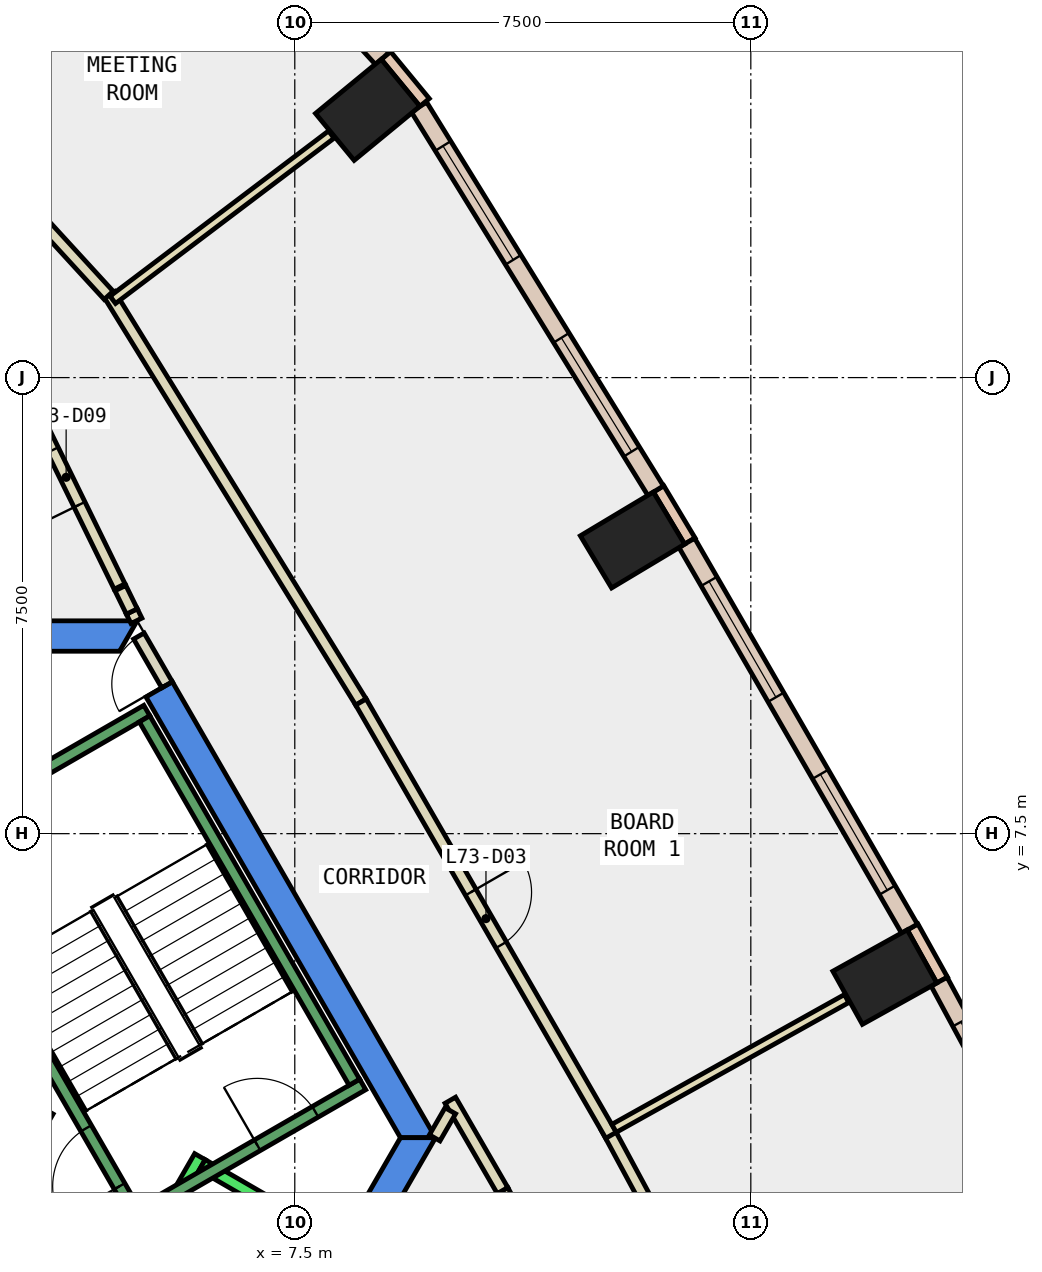
"""IFC4 building model, lengths in metres.
Left out: names, types, materials, properties, quantities, classifications, styles, units other than length and angle.
Written with IfcOpenShell. Run it as: python <this file> out.ifc"""

import sys

from ifc_helpers import new_model, si_unit, direction, frame, frame_2d, origin, origin_2d, place, context, subcontext, project, spatial, polyline, rectangle, outline, extrude, element, fill, save


model = new_model("IFC4")
c1 = context("Model", 3, precision=1e-05, world=origin(), true_north=direction((0.0, 1.0)))
c2 = subcontext(c1, "Body", "Model", "MODEL_VIEW")
j1 = project(units=[si_unit("LENGTHUNIT", "METRE"), si_unit("PLANEANGLEUNIT", "RADIAN")], contexts=[c1])
p1 = place(None, origin())
s1 = spatial("IfcSite", under=j1, at=p1, CompositionType="ELEMENT")
p2 = place(p1, origin())
s2 = spatial("IfcBuilding", under=s1, at=p2, CompositionType="ELEMENT")
p3 = place(p2, frame((0.0, 0.0, 311.6)))
s3 = spatial("IfcBuildingStorey", under=s2, at=p3, CompositionType="ELEMENT", Elevation=311.6)
for number, where, z_axis, x_axis in (
    (1, (17.204, 5.141, -0.34), (0.0, 0.0, 1.0), (-0.486, 0.874, 0.0)),
    (2, (13.054, 12.329, -0.34), (0.0, 0.0, 1.0), (-0.514, 0.858, 0.0)),
    (3, (8.699, 19.403, -0.34), (0.0, 0.0, 1.0), (-0.636, 0.772, 0.0)),
):
    element("IfcColumn", number, at=place(p3, frame(where, z_axis=z_axis, x_axis=x_axis)), inside=s3, PredefinedType="COLUMN", context=c2, shape_type="SweptSolid", body=[
        extrude(rectangle(XDim=1.0, YDim=1.4, at=origin_2d()), origin(), (0.0, 0.0, 1.0), 3.6),
    ])
p4 = place(p3, frame((0.0, 0.0, -0.34)))
e4 = element("IfcWall", 4, at=p4, inside=s3, PredefinedType="SHEAR", context=c2, shape_type="SweptSolid", body=[
    extrude(outline(polyline([(5.486, 9.998), (5.053, 9.748), (9.238, 2.5), (9.815, 2.5), (5.486, 9.998)])), origin(), (0.0, 0.0, 1.0), 3.6),
])
p5 = place(p3, frame((0.0, 0.0, -0.34)))
e5 = element("IfcWall", 5, at=p5, inside=s3, PredefinedType="SHEAR", context=c2, shape_type="SweptSolid", body=[
    extrude(outline(polyline([(4.907, 11.0), (-4.907, 11.0), (-4.619, 10.5), (4.619, 10.5), (4.907, 11.0)])), origin(), (0.0, 0.0, 1.0), 3.6),
])
p6 = place(p3, frame((0.0, 0.0, -0.34)))
e6 = element("IfcWall", 6, at=p6, inside=s3, PredefinedType="SHEAR", context=c2, shape_type="SweptSolid", body=[
    extrude(outline(polyline([(4.907, -6.0), (9.815, 2.5), (9.238, 2.5), (4.619, -5.5), (4.907, -6.0)])), origin(), (0.0, 0.0, 1.0), 3.6),
])
p7 = place(p3, frame((18.147, 5.092, 0.0), z_axis=(0.0, 0.0, 1.0), x_axis=(-0.486036693078, 0.873938403425, 0.0)))
e7 = element("IfcWall", 7, at=p7, inside=s3, PredefinedType="STANDARD", context=c2, shape_type="SweptSolid", body=[
    extrude(rectangle(XDim=1.0, YDim=0.2, at=frame_2d((0.5, 0.0))), origin(), (0.0, 0.0, 1.0), 3.26),
])
p8 = place(p3, frame((13.997, 12.312, 0.0), z_axis=(0.0, 0.0, 1.0), x_axis=(-0.514064933905, 0.857751271482, 0.0)))
e8 = element("IfcWall", 8, at=p8, inside=s3, PredefinedType="STANDARD", context=c2, shape_type="SweptSolid", body=[
    extrude(rectangle(XDim=1.0, YDim=0.2, at=frame_2d((0.5, 0.0))), origin(), (0.0, 0.0, 1.0), 3.26),
])
p9 = place(p3, frame((9.635, 19.525, 0.0), z_axis=(0.0, 0.0, 1.0), x_axis=(-0.6357329148, 0.77190910154, 0.0)))
e9 = element("IfcWall", 9, at=p9, inside=s3, PredefinedType="STANDARD", context=c2, shape_type="SweptSolid", body=[
    extrude(rectangle(XDim=1.0, YDim=0.2, at=frame_2d((0.5, 0.0))), origin(), (0.0, 0.0, 1.0), 3.26),
])
p10 = place(p3, frame((21.615, -1.462, 0.0), z_axis=(0.0, 0.0, 1.0), x_axis=(-0.474421773145, 0.880297666228, 0.0)))
e10 = element("IfcWall", 10, at=p10, inside=s3, PredefinedType="STANDARD", context=c2, shape_type="SweptSolid", body=[
    extrude(rectangle(XDim=7.416, YDim=0.3, at=frame_2d((3.708, 0.0))), origin(), (0.0, 0.0, 1.0), 3.26),
])
p11 = place(p10, frame((0.754, 0.0, 0.9)))
e11 = element("IfcOpeningElement", 11, at=p11, cuts=e10, PredefinedType="OPENING", context=c2, shape_type="SweptSolid", body=[
    extrude(rectangle(XDim=2.2, YDim=2.0, at=frame_2d((1.1, 1.0))), frame((0.0, 0.16, 0.0), z_axis=(0.0, -1.0, 0.0), x_axis=(1.0, 0.0, 0.0)), (0.0, 0.0, 1.0), 0.32),
])
p12 = place(p10, frame((4.462, 0.0, 0.9)))
e12 = element("IfcOpeningElement", 12, at=p12, cuts=e10, PredefinedType="OPENING", context=c2, shape_type="SweptSolid", body=[
    extrude(rectangle(XDim=2.2, YDim=2.0, at=frame_2d((1.1, 1.0))), frame((0.0, 0.16, 0.0), z_axis=(0.0, -1.0, 0.0), x_axis=(1.0, 0.0, 0.0)), (0.0, 0.0, 1.0), 0.32),
])
p13 = place(p3, frame((17.61, 5.937, 0.0), z_axis=(0.0, 0.0, 1.0), x_axis=(-0.499923391538, 0.866069629183, 0.0)))
e13 = element("IfcWall", 13, at=p13, inside=s3, PredefinedType="STANDARD", context=c2, shape_type="SweptSolid", body=[
    extrude(rectangle(XDim=7.327, YDim=0.3, at=frame_2d((3.664, 0.0))), origin(), (0.0, 0.0, 1.0), 3.26),
])
p14 = place(p13, frame((0.732, 0.0, 0.9)))
e14 = element("IfcOpeningElement", 14, at=p14, cuts=e13, PredefinedType="OPENING", context=c2, shape_type="SweptSolid", body=[
    extrude(rectangle(XDim=2.2, YDim=2.0, at=frame_2d((1.1, 1.0))), frame((0.0, 0.16, 0.0), z_axis=(0.0, -1.0, 0.0), x_axis=(1.0, 0.0, 0.0)), (0.0, 0.0, 1.0), 0.32),
])
p15 = place(p13, frame((4.395, 0.0, 0.9)))
e15 = element("IfcOpeningElement", 15, at=p15, cuts=e13, PredefinedType="OPENING", context=c2, shape_type="SweptSolid", body=[
    extrude(rectangle(XDim=2.2, YDim=2.0, at=frame_2d((1.1, 1.0))), frame((0.0, 0.16, 0.0), z_axis=(0.0, -1.0, 0.0), x_axis=(1.0, 0.0, 0.0)), (0.0, 0.0, 1.0), 0.32),
])
p16 = place(p3, frame((13.435, 13.14, 0.0), z_axis=(0.0, 0.0, 1.0), x_axis=(-0.525070792614, 0.851058554239, 0.0)))
e16 = element("IfcWall", 16, at=p16, inside=s3, PredefinedType="STANDARD", context=c2, shape_type="SweptSolid", body=[
    extrude(rectangle(XDim=7.414, YDim=0.3, at=frame_2d((3.707, 0.0))), origin(), (0.0, 0.0, 1.0), 3.26),
])
p17 = place(p16, frame((0.754, 0.0, 0.9)))
e17 = element("IfcOpeningElement", 17, at=p17, cuts=e16, PredefinedType="OPENING", context=c2, shape_type="SweptSolid", body=[
    extrude(rectangle(XDim=2.2, YDim=2.0, at=frame_2d((1.1, 1.0))), frame((0.0, 0.16, 0.0), z_axis=(0.0, -1.0, 0.0), x_axis=(1.0, 0.0, 0.0)), (0.0, 0.0, 1.0), 0.32),
])
p18 = place(p16, frame((4.461, 0.0, 0.9)))
e18 = element("IfcOpeningElement", 18, at=p18, cuts=e16, PredefinedType="OPENING", context=c2, shape_type="SweptSolid", body=[
    extrude(rectangle(XDim=2.2, YDim=2.0, at=frame_2d((1.1, 1.0))), frame((0.0, 0.16, 0.0), z_axis=(0.0, -1.0, 0.0), x_axis=(1.0, 0.0, 0.0)), (0.0, 0.0, 1.0), 0.32),
])
p19 = place(p3, frame((8.94, 20.248, 0.0), z_axis=(0.0, 0.0, 1.0), x_axis=(-0.675798306171, 0.737086595575, 0.0)))
e19 = element("IfcWall", 19, at=p19, inside=s3, PredefinedType="STANDARD", context=c2, shape_type="SweptSolid", body=[
    extrude(rectangle(XDim=4.501, YDim=0.3, at=frame_2d((2.25, 0.0))), origin(), (0.0, 0.0, 1.0), 3.26),
])
p20 = place(p19, frame((1.551, 0.0, 0.9)))
e20 = element("IfcOpeningElement", 20, at=p20, cuts=e19, PredefinedType="OPENING", context=c2, shape_type="SweptSolid", body=[
    extrude(rectangle(XDim=1.4, YDim=2.0, at=frame_2d((0.7, 1.0))), frame((0.0, 0.16, 0.0), z_axis=(0.0, -1.0, 0.0), x_axis=(1.0, 0.0, 0.0)), (0.0, 0.0, 1.0), 0.32),
])
p21 = place(p3, frame((4.896, 11.0, 0.0), z_axis=(0.0, 0.0, 1.0), x_axis=(-0.44208884847, 0.896971264901, 0.0)))
e21 = element("IfcWall", 21, at=p21, inside=s3, PredefinedType="PARTITIONING", context=c2, shape_type="SweptSolid", body=[
    extrude(rectangle(XDim=0.172, YDim=0.2, at=frame_2d((0.086, 0.0))), origin(), (0.0, 0.0, 1.0), 2.4),
])
p22 = place(p3, frame((4.619, 11.564, 0.0), z_axis=(0.0, 0.0, 1.0), x_axis=(-0.439654479941, 0.898166987964, 0.0)))
e22 = element("IfcWall", 22, at=p22, inside=s3, PredefinedType="PARTITIONING", context=c2, shape_type="SweptSolid", body=[
    extrude(rectangle(XDim=4.0, YDim=0.2, at=frame_2d((2.0, 0.0))), origin(), (0.0, 0.0, 1.0), 3.26),
])
p23 = place(p22, frame((1.5, 0.0, 0.0)))
e23 = element("IfcOpeningElement", 23, at=p23, cuts=e22, PredefinedType="OPENING", context=c2, shape_type="SweptSolid", body=[
    extrude(rectangle(XDim=1.0, YDim=2.1, at=frame_2d((0.5, 1.05))), frame((0.0, 0.11, 0.0), z_axis=(0.0, -1.0, 0.0), x_axis=(1.0, 0.0, 0.0)), (0.0, 0.0, 1.0), 0.22),
])
p24 = place(p3, frame((14.549, -5.107, 0.0), z_axis=(0.0, 0.0, 1.0), x_axis=(-0.47449538478, 0.880257990491, 0.0)))
e24 = element("IfcWall", 24, at=p24, inside=s3, PredefinedType="PARTITIONING", context=c2, shape_type="SweptSolid", body=[
    extrude(rectangle(XDim=7.655, YDim=0.2, at=frame_2d((3.827, 0.0))), origin(), (0.0, 0.0, 1.0), 3.26),
])
p25 = place(p24, frame((2.927, 0.0, 0.0)))
e25 = element("IfcOpeningElement", 25, at=p25, cuts=e24, PredefinedType="OPENING", context=c2, shape_type="SweptSolid", body=[
    extrude(rectangle(XDim=1.8, YDim=2.1, at=frame_2d((0.9, 1.05))), frame((0.0, 0.11, 0.0), z_axis=(0.0, -1.0, 0.0), x_axis=(1.0, 0.0, 0.0)), (0.0, 0.0, 1.0), 0.22),
])
p26 = place(p3, frame((10.917, 1.631, 0.0), z_axis=(0.0, 0.0, 1.0), x_axis=(-0.500699613169, 0.865621104972, 0.0)))
e26 = element("IfcWall", 26, at=p26, inside=s3, PredefinedType="PARTITIONING", context=c2, shape_type="SweptSolid", body=[
    extrude(rectangle(XDim=1.715, YDim=0.2, at=frame_2d((0.858, 0.0))), origin(), (0.0, 0.0, 1.0), 3.26),
])
p27 = place(p3, frame((10.058, 2.943, 0.0), z_axis=(0.0, 0.0, 1.0), x_axis=(-0.499352927503, -0.866398669086, 0.0)))
e27 = element("IfcWall", 27, at=p27, inside=s3, PredefinedType="PARTITIONING", context=c2, shape_type="SweptSolid", body=[
    extrude(rectangle(XDim=0.515, YDim=0.2, at=frame_2d((0.257, 0.0))), origin(), (0.0, 0.0, 1.0), 3.26),
])
p28 = place(p3, frame((12.628, 2.671, 0.0), z_axis=(0.0, 0.0, 1.0), x_axis=(0.474489967676, -0.880260910512, 0.0)))
e28 = element("IfcWall", 28, at=p28, inside=s3, PredefinedType="PARTITIONING", context=c2, shape_type="SweptSolid", body=[
    extrude(rectangle(XDim=7.948, YDim=0.2, at=frame_2d((3.974, 0.0))), origin(), (0.0, 0.0, 1.0), 3.26),
])
p29 = place(p28, frame((3.474, 0.0, 0.0)))
e29 = element("IfcOpeningElement", 29, at=p29, cuts=e28, PredefinedType="OPENING", context=c2, shape_type="SweptSolid", body=[
    extrude(rectangle(XDim=1.0, YDim=2.1, at=frame_2d((0.5, 1.05))), frame((0.0, 0.11, 0.0), z_axis=(0.0, -1.0, 0.0), x_axis=(1.0, 0.0, 0.0)), (0.0, 0.0, 1.0), 0.22),
])
p30 = place(p3, frame((4.454, 16.364, 0.0), z_axis=(0.0, 0.0, 1.0), x_axis=(0.525142215688, -0.851014484778, 0.0)))
e30 = element("IfcWall", 30, at=p30, inside=s3, PredefinedType="PARTITIONING", context=c2, shape_type="SweptSolid", body=[
    extrude(rectangle(XDim=7.872, YDim=0.2, at=frame_2d((3.936, 0.0))), origin(), (0.0, 0.0, 1.0), 3.26),
])
p31 = place(p3, frame((8.588, 9.665, 0.0), z_axis=(0.0, 0.0, 1.0), x_axis=(0.499946799636, -0.86605611685, 0.0)))
e31 = element("IfcWall", 31, at=p31, inside=s3, PredefinedType="PARTITIONING", context=c2, shape_type="SweptSolid", body=[
    extrude(rectangle(XDim=8.227, YDim=0.2, at=frame_2d((4.114, 0.0))), origin(), (0.0, 0.0, 1.0), 3.26),
])
p32 = place(p31, frame((3.613, 0.0, 0.0)))
e32 = element("IfcOpeningElement", 32, at=p32, cuts=e31, PredefinedType="OPENING", context=c2, shape_type="SweptSolid", body=[
    extrude(rectangle(XDim=1.0, YDim=2.1, at=frame_2d((0.5, 1.05))), frame((0.0, 0.11, 0.0), z_axis=(0.0, -1.0, 0.0), x_axis=(1.0, 0.0, 0.0)), (0.0, 0.0, 1.0), 0.22),
])
p33 = place(p3, frame((2.204, 18.791, 0.0), z_axis=(0.0, 0.0, 1.0), x_axis=(0.675731313907, -0.737148011871, 0.0)))
e33 = element("IfcWall", 33, at=p33, inside=s3, PredefinedType="PARTITIONING", context=c2, shape_type="SweptSolid", body=[
    extrude(rectangle(XDim=3.307, YDim=0.2, at=frame_2d((1.654, 0.0))), origin(), (0.0, 0.0, 1.0), 3.26),
])
p34 = place(p3, frame((1.866, 3.732, 0.0), z_axis=(0.0, 0.0, 1.0), x_axis=(0.866043361281, -0.499968895414, 0.0)))
e34 = element("IfcWall", 34, at=p34, inside=s3, PredefinedType="PARTITIONING", context=c2, shape_type="SweptSolid", body=[
    extrude(rectangle(XDim=1.858, YDim=0.2, at=frame_2d((0.929, 0.0))), origin(), (0.0, 0.0, 1.0), 3.26),
])
p35 = place(p34, frame((0.379, 0.0, 0.0)))
e35 = element("IfcOpeningElement", 35, at=p35, cuts=e34, PredefinedType="OPENING", context=c2, shape_type="SweptSolid", body=[
    extrude(rectangle(XDim=1.0, YDim=2.1, at=frame_2d((0.5, 1.05))), frame((0.0, 0.11, 0.0), z_axis=(0.0, -1.0, 0.0), x_axis=(1.0, 0.0, 0.0)), (0.0, 0.0, 1.0), 0.22),
])
p36 = place(p3, frame((12.751, 2.654, 0.0), z_axis=(0.0, 0.0, 1.0), x_axis=(0.873277679945, 0.487222837837, 0.0)))
e36 = element("IfcWall", 36, at=p36, inside=s3, PredefinedType="PARTITIONING", context=c2, shape_type="SweptSolid", body=[
    extrude(rectangle(XDim=4.38, YDim=0.15, at=frame_2d((2.19, 0.0))), origin(), (0.0, 0.0, 1.0), 3.26),
])
p37 = place(p3, frame((4.507, 16.279, 0.0), z_axis=(0.0, 0.0, 1.0), x_axis=(0.797594482062, 0.603194033611, 0.0)))
e37 = element("IfcWall", 37, at=p37, inside=s3, PredefinedType="PARTITIONING", context=c2, shape_type="SweptSolid", body=[
    extrude(rectangle(XDim=4.506, YDim=0.15, at=frame_2d((2.253, 0.0))), origin(), (0.0, 0.0, 1.0), 3.26),
])
p38 = place(p3, frame((5.399, 9.948, 0.0), z_axis=(0.0, 0.0, 1.0), x_axis=(-0.499882215713, 0.866093395895, 0.0)))
e38 = element("IfcWall", 38, at=p38, inside=s3, PredefinedType="PARTITIONING", context=c2, shape_type="SweptSolid", body=[
    extrude(rectangle(XDim=0.926, YDim=0.2, at=frame_2d((0.463, 0.0))), origin(), (0.0, 0.0, 1.0), 2.4),
])
p39 = place(p38, frame((0.017, 0.0, 0.0)))
e39 = element("IfcOpeningElement", 39, at=p39, cuts=e38, PredefinedType="OPENING", context=c2, shape_type="SweptSolid", body=[
    extrude(rectangle(XDim=0.9, YDim=2.1, at=frame_2d((0.45, 1.05))), frame((0.0, 0.11, 0.0), z_axis=(0.0, -1.0, 0.0), x_axis=(1.0, 0.0, 0.0)), (0.0, 0.0, 1.0), 0.22),
])
p40 = place(p3, frame((4.82, 11.154, 0.0), z_axis=(0.0, 0.0, 1.0), x_axis=(-0.439660677009, 0.898163954461, 0.0)))
e40 = element("IfcWall", 40, at=p40, inside=s3, PredefinedType="PARTITIONING", context=c2, shape_type="SweptSolid", body=[
    extrude(rectangle(XDim=0.427, YDim=0.2, at=frame_2d((0.214, 0.0))), origin(), (0.0, 0.0, 1.0), 3.26),
])
p41 = place(p3, frame((3.24, -2.488, 0.0), z_axis=(0.0, 0.0, 1.0), x_axis=(0.500034260056, 0.866005622828, 0.0)))
e41 = element("IfcWall", 41, at=p41, inside=s3, PredefinedType="STANDARD", context=c2, shape_type="SweptSolid", body=[
    extrude(rectangle(XDim=5.399, YDim=0.2, at=frame_2d((2.7, 0.0))), origin(), (0.0, 0.0, 1.0), 3.26),
])
p42 = place(p41, frame((3.225, 0.0, 0.0)))
e42 = element("IfcOpeningElement", 42, at=p42, cuts=e41, PredefinedType="OPENING", context=c2, shape_type="SweptSolid", body=[
    extrude(rectangle(XDim=1.1, YDim=2.1, at=frame_2d((0.55, 1.05))), frame((0.0, 0.11, 0.0), z_axis=(0.0, -1.0, 0.0), x_axis=(1.0, 0.0, 0.0)), (0.0, 0.0, 1.0), 0.22),
])
p43 = place(p41, frame((1.225, 0.0, 0.0)))
e43 = element("IfcOpeningElement", 43, at=p43, cuts=e41, PredefinedType="OPENING", context=c2, shape_type="SweptSolid", body=[
    extrude(rectangle(XDim=1.1, YDim=2.1, at=frame_2d((0.55, 1.05))), frame((0.0, 0.11, 0.0), z_axis=(0.0, -1.0, 0.0), x_axis=(1.0, 0.0, 0.0)), (0.0, 0.0, 1.0), 0.22),
])
p44 = place(p3, frame((5.977, 2.052, 0.0), z_axis=(0.0, 0.0, 1.0), x_axis=(0.865973769406, -0.500089422704, 0.0)))
e44 = element("IfcWall", 44, at=p44, inside=s3, PredefinedType="STANDARD", context=c2, shape_type="SweptSolid", body=[
    extrude(rectangle(XDim=2.399, YDim=0.2, at=frame_2d((1.2, 0.0))), origin(), (0.0, 0.0, 1.0), 3.26),
])
p45 = place(p3, frame((4.806, 1.176, 0.0), z_axis=(0.0, 0.0, 1.0), x_axis=(0.866059941101, 0.499940174841, 0.0)))
e45 = element("IfcWall", 45, at=p45, inside=s3, PredefinedType="STANDARD", context=c2, shape_type="SweptSolid", body=[
    extrude(rectangle(XDim=4.4, YDim=0.2, at=frame_2d((2.2, 0.0))), origin(), (0.0, 0.0, 1.0), 3.26),
])
p46 = place(p45, frame((2.4, 0.0, 0.0)))
e46 = element("IfcOpeningElement", 46, at=p46, cuts=e45, PredefinedType="OPENING", context=c2, shape_type="SweptSolid", body=[
    extrude(rectangle(XDim=1.1, YDim=2.2, at=frame_2d((0.55, 1.1))), frame((0.0, 0.11, 0.0), z_axis=(0.0, -1.0, 0.0), x_axis=(1.0, 0.0, 0.0)), (0.0, 0.0, 1.0), 0.22),
])
p47 = place(p3, frame((2.7, 8.158, 0.0), z_axis=(0.0, 0.0, 1.0), x_axis=(0.86611865017, 0.499838457731, 0.0)))
e47 = element("IfcWall", 47, at=p47, inside=s3, PredefinedType="STANDARD", context=c2, shape_type="SweptSolid", body=[
    extrude(rectangle(XDim=2.733, YDim=0.2, at=frame_2d((1.366, 0.0))), origin(), (0.0, 0.0, 1.0), 3.26),
])
p48 = place(p3, frame((4.843, 1.312, 0.0), z_axis=(0.0, 0.0, 1.0), x_axis=(-0.499963383562, 0.866046543262, 0.0)))
e48 = element("IfcWall", 48, at=p48, inside=s3, PredefinedType="STANDARD", context=c2, shape_type="SweptSolid", body=[
    extrude(rectangle(XDim=6.9, YDim=0.2, at=frame_2d((3.45, 0.0))), origin(), (0.0, 0.0, 1.0), 3.26),
])
p49 = place(p48, frame((0.45, 0.0, 0.0)))
e49 = element("IfcOpeningElement", 49, at=p49, cuts=e48, PredefinedType="OPENING", context=c2, shape_type="SweptSolid", body=[
    extrude(rectangle(XDim=1.1, YDim=2.2, at=frame_2d((0.55, 1.1))), frame((0.0, 0.11, 0.0), z_axis=(0.0, -1.0, 0.0), x_axis=(1.0, 0.0, 0.0)), (0.0, 0.0, 1.0), 0.22),
])
p50 = place(p3, frame((8.48, 3.412, 0.0), z_axis=(0.0, 0.0, 1.0), x_axis=(-0.499978703459, 0.866037698999, 0.0)))
e50 = element("IfcWall", 50, at=p50, inside=s3, PredefinedType="STANDARD", context=c2, shape_type="SweptSolid", body=[
    extrude(rectangle(XDim=6.9, YDim=0.2, at=frame_2d((3.45, 0.0))), origin(), (0.0, 0.0, 1.0), 3.26),
])
p51 = place(p12, origin())
e51 = element("IfcWindow", 51, at=p51, inside=s3, PartitioningType="SINGLE_PANEL", PredefinedType="WINDOW", context=c2, shape_type="SweptSolid", body=[
    extrude(rectangle(XDim=2.2, YDim=2.0, at=frame_2d((1.1, 1.0))), frame((0.0, 0.03, 0.0), z_axis=(0.0, -1.0, 0.0), x_axis=(1.0, 0.0, 0.0)), (0.0, 0.0, 1.0), 0.06),
])
fill(e12, e51)
p52 = place(p14, origin())
e52 = element("IfcWindow", 52, at=p52, inside=s3, PartitioningType="SINGLE_PANEL", PredefinedType="WINDOW", context=c2, shape_type="SweptSolid", body=[
    extrude(rectangle(XDim=2.2, YDim=2.0, at=frame_2d((1.1, 1.0))), frame((0.0, 0.03, 0.0), z_axis=(0.0, -1.0, 0.0), x_axis=(1.0, 0.0, 0.0)), (0.0, 0.0, 1.0), 0.06),
])
fill(e14, e52)
p53 = place(p15, origin())
e53 = element("IfcWindow", 53, at=p53, inside=s3, PartitioningType="SINGLE_PANEL", PredefinedType="WINDOW", context=c2, shape_type="SweptSolid", body=[
    extrude(rectangle(XDim=2.2, YDim=2.0, at=frame_2d((1.1, 1.0))), frame((0.0, 0.03, 0.0), z_axis=(0.0, -1.0, 0.0), x_axis=(1.0, 0.0, 0.0)), (0.0, 0.0, 1.0), 0.06),
])
fill(e15, e53)
p54 = place(p17, origin())
e54 = element("IfcWindow", 54, at=p54, inside=s3, PartitioningType="SINGLE_PANEL", PredefinedType="WINDOW", context=c2, shape_type="SweptSolid", body=[
    extrude(rectangle(XDim=2.2, YDim=2.0, at=frame_2d((1.1, 1.0))), frame((0.0, 0.03, 0.0), z_axis=(0.0, -1.0, 0.0), x_axis=(1.0, 0.0, 0.0)), (0.0, 0.0, 1.0), 0.06),
])
fill(e17, e54)
p55 = place(p18, origin())
e55 = element("IfcWindow", 55, at=p55, inside=s3, PartitioningType="SINGLE_PANEL", PredefinedType="WINDOW", context=c2, shape_type="SweptSolid", body=[
    extrude(rectangle(XDim=2.2, YDim=2.0, at=frame_2d((1.1, 1.0))), frame((0.0, 0.03, 0.0), z_axis=(0.0, -1.0, 0.0), x_axis=(1.0, 0.0, 0.0)), (0.0, 0.0, 1.0), 0.06),
])
fill(e18, e55)
p56 = place(p32, origin())
e56 = element("IfcDoor", 56, at=p56, inside=s3, OperationType="SINGLE_SWING_RIGHT", PredefinedType="DOOR", context=c2, shape_type="SweptSolid", body=[
    extrude(rectangle(XDim=1.0, YDim=2.1, at=frame_2d((0.5, 1.05))), frame((0.0, 0.025, 0.0), z_axis=(0.0, -1.0, 0.0), x_axis=(1.0, 0.0, 0.0)), (0.0, 0.0, 1.0), 0.05),
])
fill(e32, e56)
p57 = place(p23, origin())
e57 = element("IfcDoor", 57, at=p57, inside=s3, OperationType="SINGLE_SWING_LEFT", PredefinedType="DOOR", context=c2, shape_type="SweptSolid", body=[
    extrude(rectangle(XDim=1.0, YDim=2.1, at=frame_2d((0.5, 1.05))), frame((0.0, 0.025, 0.0), z_axis=(0.0, -1.0, 0.0), x_axis=(1.0, 0.0, 0.0)), (0.0, 0.0, 1.0), 0.05),
])
fill(e23, e57)
p58 = place(p39, origin())
e58 = element("IfcDoor", 58, at=p58, inside=s3, OperationType="SINGLE_SWING_LEFT", PredefinedType="DOOR", context=c2, shape_type="SweptSolid", body=[
    extrude(rectangle(XDim=0.9, YDim=2.1, at=frame_2d((0.45, 1.05))), frame((0.0, 0.025, 0.0), z_axis=(0.0, -1.0, 0.0), x_axis=(1.0, 0.0, 0.0)), (0.0, 0.0, 1.0), 0.05),
])
fill(e39, e58)
p59 = place(p49, origin())
e59 = element("IfcDoor", 59, at=p59, inside=s3, OperationType="SINGLE_SWING_LEFT", PredefinedType="DOOR", context=c2, shape_type="SweptSolid", body=[
    extrude(rectangle(XDim=1.1, YDim=2.2, at=frame_2d((0.55, 1.1))), frame((0.0, 0.025, 0.0), z_axis=(0.0, -1.0, 0.0), x_axis=(1.0, 0.0, 0.0)), (0.0, 0.0, 1.0), 0.05),
])
fill(e49, e59)
p60 = place(p46, origin())
e60 = element("IfcDoor", 60, at=p60, inside=s3, OperationType="SINGLE_SWING_LEFT", PredefinedType="DOOR", context=c2, shape_type="SweptSolid", body=[
    extrude(rectangle(XDim=1.1, YDim=2.2, at=frame_2d((0.55, 1.1))), frame((0.0, 0.025, 0.0), z_axis=(0.0, -1.0, 0.0), x_axis=(1.0, 0.0, 0.0)), (0.0, 0.0, 1.0), 0.05),
])
fill(e46, e60)
save(model, sys.argv[1])
